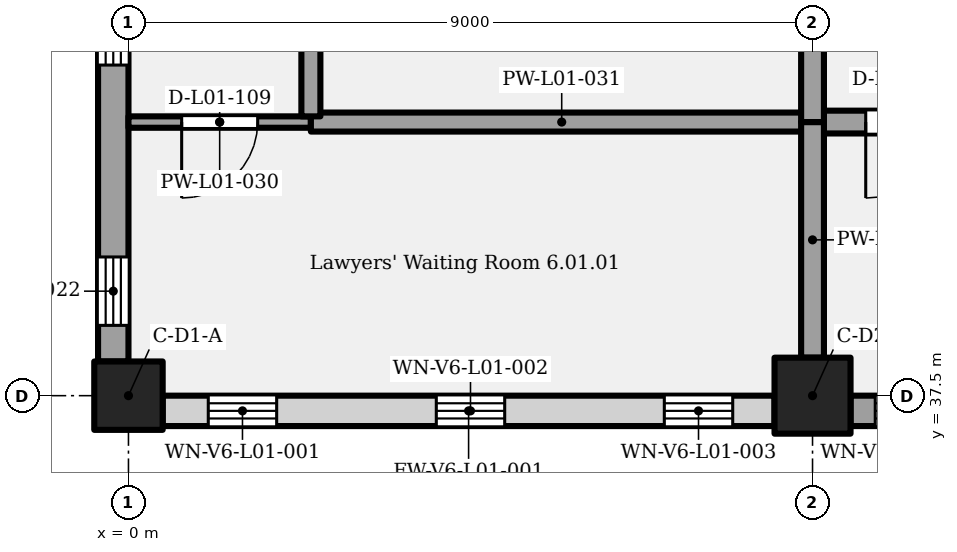
"""IFC4 building model, lengths in metres.
Left out: names, types, materials, properties, quantities, classifications, styles, units other than length and angle.
Written with IfcOpenShell. Run it as: python <this file> out.ifc"""

import sys

from ifc_helpers import new_model, si_unit, direction, frame, frame_2d, origin, origin_2d, place, context, subcontext, project, spatial, rectangle, extrude, element, fill, save


model = new_model("IFC4")
c1 = context("Model", 3, precision=1e-05, world=origin(), true_north=direction((0.0, 1.0)))
c2 = subcontext(c1, "Body", "Model", "MODEL_VIEW")
j1 = project(units=[si_unit("LENGTHUNIT", "METRE"), si_unit("PLANEANGLEUNIT", "RADIAN")], contexts=[c1])
p1 = place(None, origin())
s1 = spatial("IfcSite", under=j1, at=p1, CompositionType="ELEMENT")
p2 = place(p1, origin())
s2 = spatial("IfcBuilding", under=s1, at=p2, CompositionType="ELEMENT")
p3 = place(p2, frame((0.0, 0.0, 6.6)))
s3 = spatial("IfcBuildingStorey", under=s2, at=p3, CompositionType="ELEMENT", Elevation=6.6)
p4 = place(p3, frame((0.0, 37.5, 0.0), z_axis=(0.0, 0.0, 1.0), x_axis=(1.0, 0.0, 0.0)))
e1 = element("IfcColumn", 1, at=p4, inside=s3, PredefinedType="COLUMN", context=c2, shape_type="SweptSolid", body=[
    extrude(rectangle(XDim=0.9, YDim=0.9, at=origin_2d()), origin(), (0.0, 0.0, 1.0), 5.4),
])
p5 = place(p3, frame((9.0, 37.5, 0.0), z_axis=(0.0, 0.0, 1.0), x_axis=(1.0, 0.0, 0.0)))
e2 = element("IfcColumn", 2, at=p5, inside=s3, PredefinedType="COLUMN", context=c2, shape_type="SweptSolid", body=[
    extrude(rectangle(XDim=1.0, YDim=1.0, at=origin_2d()), origin(), (0.0, 0.0, 1.0), 5.4),
])
p6 = place(p3, frame((0.45, 37.3, 0.0), z_axis=(0.0, 0.0, 1.0), x_axis=(1.0, 0.0, 0.0)))
e3 = element("IfcWall", 3, at=p6, inside=s3, PredefinedType="SOLIDWALL", context=c2, shape_type="SweptSolid", body=[
    extrude(rectangle(XDim=8.05, YDim=0.4, at=frame_2d((4.025, 0.0))), origin(), (0.0, 0.0, 1.0), 5.1),
])
p7 = place(p6, frame((0.6, 0.0, 1.5)))
e4 = element("IfcOpeningElement", 4, at=p7, cuts=e3, PredefinedType="OPENING", context=c2, shape_type="SweptSolid", body=[
    extrude(rectangle(XDim=0.9, YDim=1.8, at=frame_2d((0.45, 0.9))), frame((0.0, 0.21, 0.0), z_axis=(0.0, -1.0, 0.0), x_axis=(1.0, 0.0, 0.0)), (0.0, 0.0, 1.0), 0.42),
])
p8 = place(p6, frame((3.6, 0.0, 1.5)))
e5 = element("IfcOpeningElement", 5, at=p8, cuts=e3, PredefinedType="OPENING", context=c2, shape_type="SweptSolid", body=[
    extrude(rectangle(XDim=0.9, YDim=1.8, at=frame_2d((0.45, 0.9))), frame((0.0, 0.21, 0.0), z_axis=(0.0, -1.0, 0.0), x_axis=(1.0, 0.0, 0.0)), (0.0, 0.0, 1.0), 0.42),
])
p9 = place(p6, frame((6.6, 0.0, 1.5)))
e6 = element("IfcOpeningElement", 6, at=p9, cuts=e3, PredefinedType="OPENING", context=c2, shape_type="SweptSolid", body=[
    extrude(rectangle(XDim=0.9, YDim=1.8, at=frame_2d((0.45, 0.9))), frame((0.0, 0.21, 0.0), z_axis=(0.0, -1.0, 0.0), x_axis=(1.0, 0.0, 0.0)), (0.0, 0.0, 1.0), 0.42),
])
p10 = place(p3, frame((9.5, 37.3, 0.0), z_axis=(0.0, 0.0, 1.0), x_axis=(1.0, 0.0, 0.0)))
e7 = element("IfcWall", 7, at=p10, inside=s3, PredefinedType="SOLIDWALL", context=c2, shape_type="SweptSolid", body=[
    extrude(rectangle(XDim=8.0, YDim=0.4, at=frame_2d((4.0, 0.0))), origin(), (0.0, 0.0, 1.0), 5.1),
])
p11 = place(p10, frame((0.325, 0.0, 1.5)))
e8 = element("IfcOpeningElement", 8, at=p11, cuts=e7, PredefinedType="OPENING", context=c2, shape_type="SweptSolid", body=[
    extrude(rectangle(XDim=0.6, YDim=3.0, at=frame_2d((0.3, 1.5))), frame((0.0, 0.21, 0.0), z_axis=(0.0, -1.0, 0.0), x_axis=(1.0, 0.0, 0.0)), (0.0, 0.0, 1.0), 0.42),
])
p12 = place(p10, frame((2.575, 0.0, 1.5)))
e9 = element("IfcOpeningElement", 9, at=p12, cuts=e7, PredefinedType="OPENING", context=c2, shape_type="SweptSolid", body=[
    extrude(rectangle(XDim=0.6, YDim=3.0, at=frame_2d((0.3, 1.5))), frame((0.0, 0.21, 0.0), z_axis=(0.0, -1.0, 0.0), x_axis=(1.0, 0.0, 0.0)), (0.0, 0.0, 1.0), 0.42),
])
p13 = place(p10, frame((4.825, 0.0, 1.5)))
e10 = element("IfcOpeningElement", 10, at=p13, cuts=e7, PredefinedType="OPENING", context=c2, shape_type="SweptSolid", body=[
    extrude(rectangle(XDim=0.6, YDim=3.0, at=frame_2d((0.3, 1.5))), frame((0.0, 0.21, 0.0), z_axis=(0.0, -1.0, 0.0), x_axis=(1.0, 0.0, 0.0)), (0.0, 0.0, 1.0), 0.42),
])
p14 = place(p10, frame((7.075, 0.0, 1.5)))
e11 = element("IfcOpeningElement", 11, at=p14, cuts=e7, PredefinedType="OPENING", context=c2, shape_type="SweptSolid", body=[
    extrude(rectangle(XDim=0.6, YDim=3.0, at=frame_2d((0.3, 1.5))), frame((0.0, 0.21, 0.0), z_axis=(0.0, -1.0, 0.0), x_axis=(1.0, 0.0, 0.0)), (0.0, 0.0, 1.0), 0.42),
])
p15 = place(p3, frame((-0.2, 37.95, 0.0), z_axis=(0.0, 0.0, 1.0), x_axis=(0.0, 1.0, 0.0)))
e12 = element("IfcWall", 12, at=p15, inside=s3, PredefinedType="SOLIDWALL", context=c2, shape_type="SweptSolid", body=[
    extrude(rectangle(XDim=15.6, YDim=0.4, at=frame_2d((7.8, 0.0))), origin(), (0.0, 0.0, 1.0), 5.1),
])
p16 = place(p15, frame((3.9, 0.0, 0.9)))
e13 = element("IfcOpeningElement", 13, at=p16, cuts=e12, PredefinedType="OPENING", context=c2, shape_type="SweptSolid", body=[
    extrude(rectangle(XDim=1.2, YDim=2.4, at=frame_2d((0.6, 1.2))), frame((0.0, 0.21, 0.0), z_axis=(0.0, -1.0, 0.0), x_axis=(1.0, 0.0, 0.0)), (0.0, 0.0, 1.0), 0.42),
])
p17 = place(p15, frame((7.2, 0.0, 0.9)))
e14 = element("IfcOpeningElement", 14, at=p17, cuts=e12, PredefinedType="OPENING", context=c2, shape_type="SweptSolid", body=[
    extrude(rectangle(XDim=1.2, YDim=2.4, at=frame_2d((0.6, 1.2))), frame((0.0, 0.21, 0.0), z_axis=(0.0, -1.0, 0.0), x_axis=(1.0, 0.0, 0.0)), (0.0, 0.0, 1.0), 0.42),
])
p18 = place(p15, frame((10.5, 0.0, 0.9)))
e15 = element("IfcOpeningElement", 15, at=p18, cuts=e12, PredefinedType="OPENING", context=c2, shape_type="SweptSolid", body=[
    extrude(rectangle(XDim=1.2, YDim=2.4, at=frame_2d((0.6, 1.2))), frame((0.0, 0.21, 0.0), z_axis=(0.0, -1.0, 0.0), x_axis=(1.0, 0.0, 0.0)), (0.0, 0.0, 1.0), 0.42),
])
p19 = place(p15, frame((13.8, 0.0, 0.9)))
e16 = element("IfcOpeningElement", 16, at=p19, cuts=e12, PredefinedType="OPENING", context=c2, shape_type="SweptSolid", body=[
    extrude(rectangle(XDim=1.2, YDim=2.4, at=frame_2d((0.6, 1.2))), frame((0.0, 0.21, 0.0), z_axis=(0.0, -1.0, 0.0), x_axis=(1.0, 0.0, 0.0)), (0.0, 0.0, 1.0), 0.42),
])
p20 = place(p15, frame((0.475, 0.0, 1.5)))
e17 = element("IfcOpeningElement", 17, at=p20, cuts=e12, PredefinedType="OPENING", context=c2, shape_type="SweptSolid", body=[
    extrude(rectangle(XDim=0.9, YDim=1.8, at=frame_2d((0.45, 0.9))), frame((0.0, 0.21, 0.0), z_axis=(0.0, -1.0, 0.0), x_axis=(1.0, 0.0, 0.0)), (0.0, 0.0, 1.0), 0.42),
])
p21 = place(p3, frame((0.0, 41.1, 0.0), z_axis=(0.0, 0.0, 1.0), x_axis=(1.0, 0.0, 0.0)))
e18 = element("IfcWall", 18, at=p21, inside=s3, PredefinedType="PARTITIONING", context=c2, shape_type="SweptSolid", body=[
    extrude(rectangle(XDim=2.4, YDim=0.15, at=frame_2d((1.2, 0.0))), origin(), (0.0, 0.0, 1.0), 5.1),
])
p22 = place(p21, frame((1.7, 0.0, 0.0), z_axis=(0.0, 0.0, 1.0), x_axis=(-1.0, 0.0, 0.0)))
e19 = element("IfcOpeningElement", 19, at=p22, cuts=e18, PredefinedType="OPENING", context=c2, shape_type="SweptSolid", body=[
    extrude(rectangle(XDim=1.0, YDim=2.1, at=frame_2d((0.5, 1.05))), frame((0.0, 0.085, 0.0), z_axis=(0.0, -1.0, 0.0), x_axis=(1.0, 0.0, 0.0)), (0.0, 0.0, 1.0), 0.17),
])
p23 = place(p3, frame((2.4, 41.1, 0.0), z_axis=(0.0, 0.0, 1.0), x_axis=(1.0, 0.0, 0.0)))
e20 = element("IfcWall", 20, at=p23, inside=s3, PredefinedType="PARTITIONING", context=c2, shape_type="SweptSolid", body=[
    extrude(rectangle(XDim=6.6, YDim=0.25, at=frame_2d((3.3, 0.0))), origin(), (0.0, 0.0, 1.0), 5.1),
])
p24 = place(p3, frame((9.0, 41.1, 0.0), z_axis=(0.0, 0.0, 1.0), x_axis=(1.0, 0.0, 0.0)))
e21 = element("IfcWall", 21, at=p24, inside=s3, PredefinedType="PARTITIONING", context=c2, shape_type="SweptSolid", body=[
    extrude(rectangle(XDim=8.85, YDim=0.3, at=frame_2d((4.425, 0.0))), origin(), (0.0, 0.0, 1.0), 5.1),
])
p25 = place(p24, frame((1.7, 0.0, 0.0), z_axis=(0.0, 0.0, 1.0), x_axis=(-1.0, 0.0, 0.0)))
e22 = element("IfcOpeningElement", 22, at=p25, cuts=e21, PredefinedType="OPENING", context=c2, shape_type="SweptSolid", body=[
    extrude(rectangle(XDim=1.0, YDim=2.1, at=frame_2d((0.5, 1.05))), frame((0.0, 0.16, 0.0), z_axis=(0.0, -1.0, 0.0), x_axis=(1.0, 0.0, 0.0)), (0.0, 0.0, 1.0), 0.32),
])
p26 = place(p3, frame((2.4, 41.175, 0.0), z_axis=(0.0, 0.0, 1.0), x_axis=(0.0, 1.0, 0.0)))
e23 = element("IfcWall", 23, at=p26, inside=s3, PredefinedType="PARTITIONING", context=c2, shape_type="SweptSolid", body=[
    extrude(rectangle(XDim=13.3, YDim=0.25, at=frame_2d((6.65, 0.0))), origin(), (0.0, 0.0, 1.0), 5.1),
])
p27 = place(p26, frame((12.125, 0.0, 0.0), z_axis=(0.0, 0.0, 1.0), x_axis=(-1.0, 0.0, 0.0)))
e24 = element("IfcOpeningElement", 24, at=p27, cuts=e23, PredefinedType="OPENING", context=c2, shape_type="SweptSolid", body=[
    extrude(rectangle(XDim=1.0, YDim=2.1, at=frame_2d((0.5, 1.05))), frame((0.0, 0.135, 0.0), z_axis=(0.0, -1.0, 0.0), x_axis=(1.0, 0.0, 0.0)), (0.0, 0.0, 1.0), 0.27),
])
p28 = place(p26, frame((8.675, 0.0, 0.0), z_axis=(0.0, 0.0, 1.0), x_axis=(-1.0, 0.0, 0.0)))
e25 = element("IfcOpeningElement", 25, at=p28, cuts=e23, PredefinedType="OPENING", context=c2, shape_type="SweptSolid", body=[
    extrude(rectangle(XDim=1.0, YDim=2.1, at=frame_2d((0.5, 1.05))), frame((0.0, 0.135, 0.0), z_axis=(0.0, -1.0, 0.0), x_axis=(1.0, 0.0, 0.0)), (0.0, 0.0, 1.0), 0.27),
])
p29 = place(p26, frame((5.375, 0.0, 0.0), z_axis=(0.0, 0.0, 1.0), x_axis=(-1.0, 0.0, 0.0)))
e26 = element("IfcOpeningElement", 26, at=p29, cuts=e23, PredefinedType="OPENING", context=c2, shape_type="SweptSolid", body=[
    extrude(rectangle(XDim=1.0, YDim=2.1, at=frame_2d((0.5, 1.05))), frame((0.0, 0.135, 0.0), z_axis=(0.0, -1.0, 0.0), x_axis=(1.0, 0.0, 0.0)), (0.0, 0.0, 1.0), 0.27),
])
p30 = place(p26, frame((2.075, 0.0, 0.0), z_axis=(0.0, 0.0, 1.0), x_axis=(-1.0, 0.0, 0.0)))
e27 = element("IfcOpeningElement", 27, at=p30, cuts=e23, PredefinedType="OPENING", context=c2, shape_type="SweptSolid", body=[
    extrude(rectangle(XDim=1.0, YDim=2.1, at=frame_2d((0.5, 1.05))), frame((0.0, 0.135, 0.0), z_axis=(0.0, -1.0, 0.0), x_axis=(1.0, 0.0, 0.0)), (0.0, 0.0, 1.0), 0.27),
])
p31 = place(p3, frame((9.0, 38.0, 0.0), z_axis=(0.0, 0.0, 1.0), x_axis=(0.0, 1.0, 0.0)))
e28 = element("IfcWall", 28, at=p31, inside=s3, PredefinedType="PARTITIONING", context=c2, shape_type="SweptSolid", body=[
    extrude(rectangle(XDim=3.1, YDim=0.3, at=frame_2d((1.55, 0.0))), origin(), (0.0, 0.0, 1.0), 4.15),
])
p32 = place(p3, frame((9.0, 41.1, 0.0), z_axis=(0.0, 0.0, 1.0), x_axis=(0.0, 1.0, 0.0)))
e29 = element("IfcWall", 29, at=p32, inside=s3, PredefinedType="PARTITIONING", context=c2, shape_type="SweptSolid", body=[
    extrude(rectangle(XDim=12.4, YDim=0.3, at=frame_2d((6.2, 0.0))), origin(), (0.0, 0.0, 1.0), 4.15),
])
p33 = place(p32, frame((11.2, 0.0, 0.0)))
e30 = element("IfcOpeningElement", 30, at=p33, cuts=e29, PredefinedType="OPENING", context=c2, shape_type="SweptSolid", body=[
    extrude(rectangle(XDim=1.0, YDim=2.1, at=frame_2d((0.5, 1.05))), frame((0.0, 0.16, 0.0), z_axis=(0.0, -1.0, 0.0), x_axis=(1.0, 0.0, 0.0)), (0.0, 0.0, 1.0), 0.32),
])
p34 = place(p32, frame((7.75, 0.0, 0.0)))
e31 = element("IfcOpeningElement", 31, at=p34, cuts=e29, PredefinedType="OPENING", context=c2, shape_type="SweptSolid", body=[
    extrude(rectangle(XDim=1.0, YDim=2.1, at=frame_2d((0.5, 1.05))), frame((0.0, 0.16, 0.0), z_axis=(0.0, -1.0, 0.0), x_axis=(1.0, 0.0, 0.0)), (0.0, 0.0, 1.0), 0.32),
])
p35 = place(p32, frame((4.45, 0.0, 0.0)))
e32 = element("IfcOpeningElement", 32, at=p35, cuts=e29, PredefinedType="OPENING", context=c2, shape_type="SweptSolid", body=[
    extrude(rectangle(XDim=1.0, YDim=2.1, at=frame_2d((0.5, 1.05))), frame((0.0, 0.16, 0.0), z_axis=(0.0, -1.0, 0.0), x_axis=(1.0, 0.0, 0.0)), (0.0, 0.0, 1.0), 0.32),
])
p36 = place(p32, frame((1.15, 0.0, 0.0)))
e33 = element("IfcOpeningElement", 33, at=p36, cuts=e29, PredefinedType="OPENING", context=c2, shape_type="SweptSolid", body=[
    extrude(rectangle(XDim=1.0, YDim=2.1, at=frame_2d((0.5, 1.05))), frame((0.0, 0.16, 0.0), z_axis=(0.0, -1.0, 0.0), x_axis=(1.0, 0.0, 0.0)), (0.0, 0.0, 1.0), 0.32),
])
p37 = place(p7, origin())
e34 = element("IfcWindow", 34, at=p37, inside=s3, PartitioningType="SINGLE_PANEL", PredefinedType="WINDOW", context=c2, shape_type="SweptSolid", body=[
    extrude(rectangle(XDim=0.9, YDim=1.8, at=frame_2d((0.45, 0.9))), frame((0.0, 0.03, 0.0), z_axis=(0.0, -1.0, 0.0), x_axis=(1.0, 0.0, 0.0)), (0.0, 0.0, 1.0), 0.06),
])
fill(e4, e34)
p38 = place(p8, origin())
e35 = element("IfcWindow", 35, at=p38, inside=s3, PartitioningType="SINGLE_PANEL", PredefinedType="WINDOW", context=c2, shape_type="SweptSolid", body=[
    extrude(rectangle(XDim=0.9, YDim=1.8, at=frame_2d((0.45, 0.9))), frame((0.0, 0.03, 0.0), z_axis=(0.0, -1.0, 0.0), x_axis=(1.0, 0.0, 0.0)), (0.0, 0.0, 1.0), 0.06),
])
fill(e5, e35)
p39 = place(p9, origin())
e36 = element("IfcWindow", 36, at=p39, inside=s3, PartitioningType="SINGLE_PANEL", PredefinedType="WINDOW", context=c2, shape_type="SweptSolid", body=[
    extrude(rectangle(XDim=0.9, YDim=1.8, at=frame_2d((0.45, 0.9))), frame((0.0, 0.03, 0.0), z_axis=(0.0, -1.0, 0.0), x_axis=(1.0, 0.0, 0.0)), (0.0, 0.0, 1.0), 0.06),
])
fill(e6, e36)
p40 = place(p11, origin())
e37 = element("IfcWindow", 37, at=p40, inside=s3, PartitioningType="SINGLE_PANEL", PredefinedType="WINDOW", context=c2, shape_type="SweptSolid", body=[
    extrude(rectangle(XDim=0.6, YDim=3.0, at=frame_2d((0.3, 1.5))), frame((0.0, 0.03, 0.0), z_axis=(0.0, -1.0, 0.0), x_axis=(1.0, 0.0, 0.0)), (0.0, 0.0, 1.0), 0.06),
])
fill(e8, e37)
p41 = place(p16, origin())
e38 = element("IfcWindow", 38, at=p41, inside=s3, PartitioningType="SINGLE_PANEL", PredefinedType="WINDOW", context=c2, shape_type="SweptSolid", body=[
    extrude(rectangle(XDim=1.2, YDim=2.4, at=frame_2d((0.6, 1.2))), frame((0.0, 0.03, 0.0), z_axis=(0.0, -1.0, 0.0), x_axis=(1.0, 0.0, 0.0)), (0.0, 0.0, 1.0), 0.06),
])
fill(e13, e38)
p42 = place(p20, origin())
e39 = element("IfcWindow", 39, at=p42, inside=s3, PartitioningType="SINGLE_PANEL", PredefinedType="WINDOW", context=c2, shape_type="SweptSolid", body=[
    extrude(rectangle(XDim=0.9, YDim=1.8, at=frame_2d((0.45, 0.9))), frame((0.0, 0.03, 0.0), z_axis=(0.0, -1.0, 0.0), x_axis=(1.0, 0.0, 0.0)), (0.0, 0.0, 1.0), 0.06),
])
fill(e17, e39)
p43 = place(p22, origin())
e40 = element("IfcDoor", 40, at=p43, inside=s3, OperationType="SINGLE_SWING_RIGHT", PredefinedType="DOOR", context=c2, shape_type="SweptSolid", body=[
    extrude(rectangle(XDim=1.0, YDim=2.1, at=frame_2d((0.5, 1.05))), frame((0.0, 0.025, 0.0), z_axis=(0.0, -1.0, 0.0), x_axis=(1.0, 0.0, 0.0)), (0.0, 0.0, 1.0), 0.05),
])
fill(e19, e40)
p44 = place(p25, origin())
e41 = element("IfcDoor", 41, at=p44, inside=s3, OperationType="SINGLE_SWING_RIGHT", PredefinedType="DOOR", context=c2, shape_type="SweptSolid", body=[
    extrude(rectangle(XDim=1.0, YDim=2.1, at=frame_2d((0.5, 1.05))), frame((0.0, 0.025, 0.0), z_axis=(0.0, -1.0, 0.0), x_axis=(1.0, 0.0, 0.0)), (0.0, 0.0, 1.0), 0.05),
])
fill(e22, e41)
save(model, sys.argv[1])
